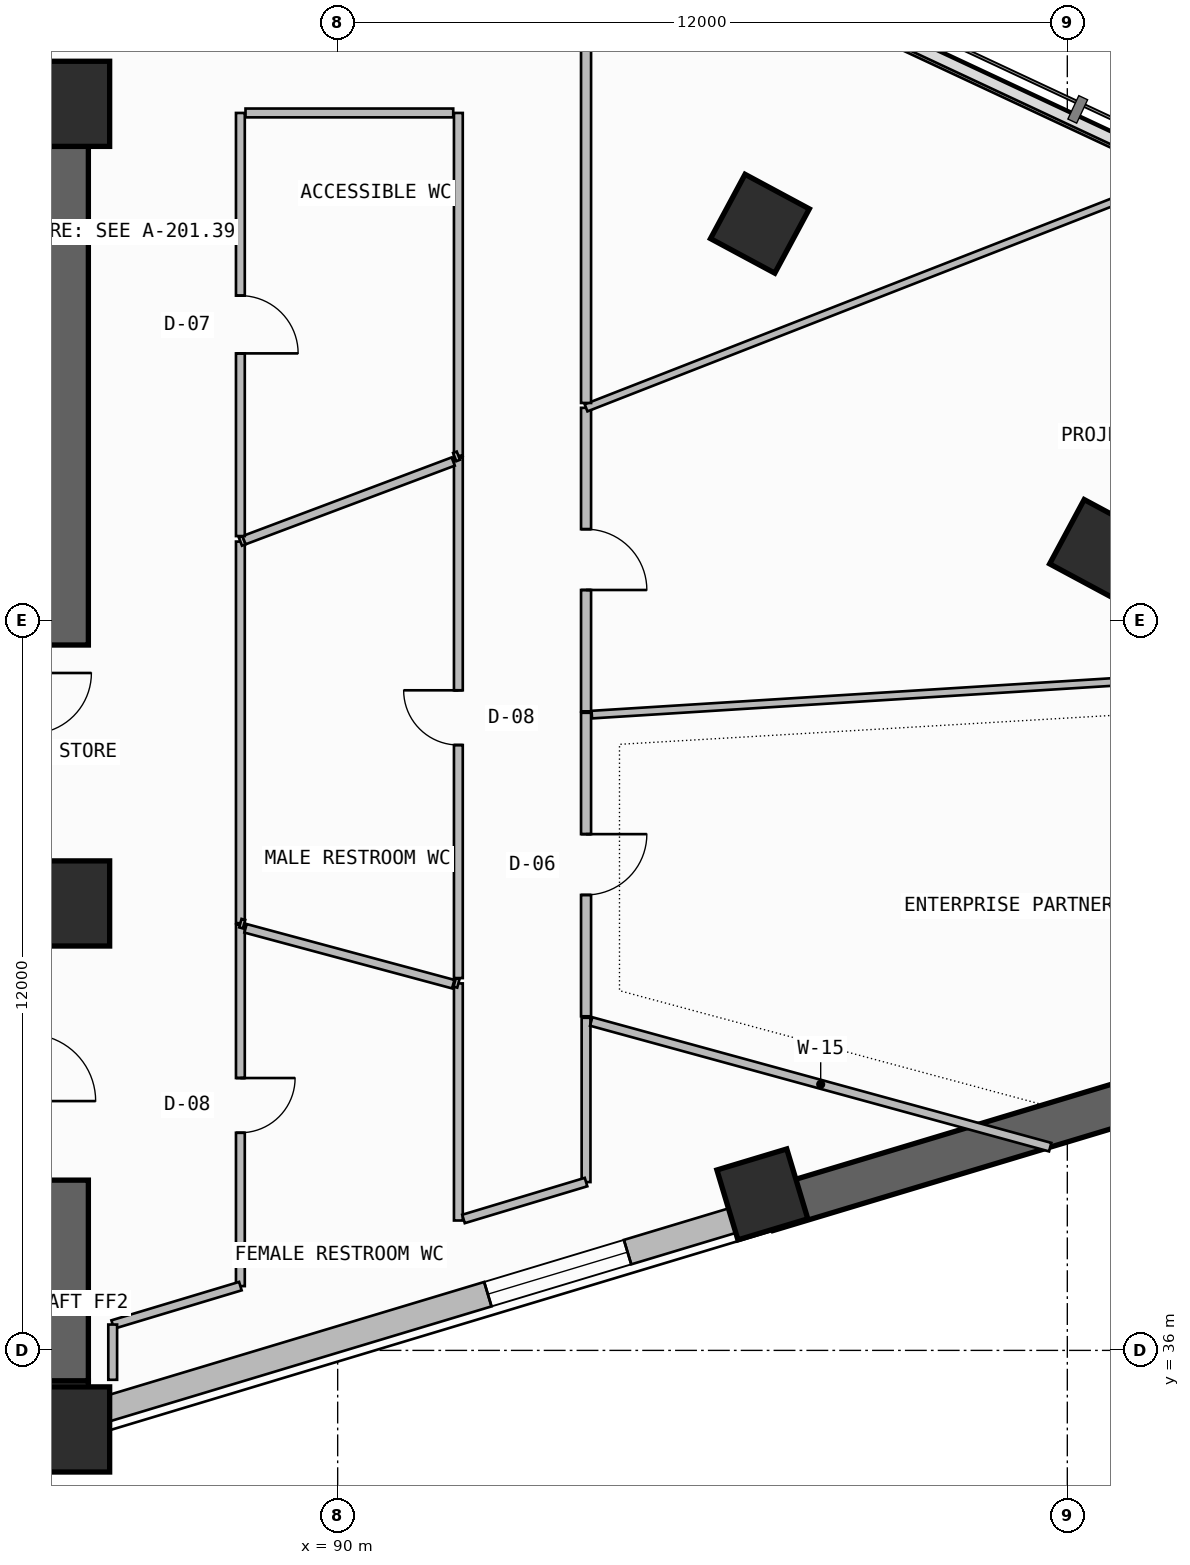
"""IFC4 building model, lengths in metres.
Left out: names, types, materials, properties, quantities, classifications, styles, units other than length and angle.
Written with IfcOpenShell. Run it as: python <this file> out.ifc"""

import sys

from ifc_helpers import new_model, si_unit, direction, frame, frame_2d, origin, origin_2d, place, context, subcontext, project, spatial, rectangle, extrude, element, fill, save


model = new_model("IFC4")
c1 = context("Model", 3, precision=1e-05, world=origin(), true_north=direction((0.0, 1.0)))
c2 = subcontext(c1, "Body", "Model", "MODEL_VIEW")
j1 = project(units=[si_unit("LENGTHUNIT", "METRE"), si_unit("PLANEANGLEUNIT", "RADIAN")], contexts=[c1])
p1 = place(None, origin())
s1 = spatial("IfcSite", under=j1, at=p1, CompositionType="ELEMENT")
p2 = place(p1, origin())
s2 = spatial("IfcBuilding", under=s1, at=p2, CompositionType="ELEMENT")
p3 = place(p2, frame((0.0, 0.0, 139.5)))
s3 = spatial("IfcBuildingStorey", under=s2, at=p3, CompositionType="ELEMENT", Elevation=139.5)
p4 = place(p3, frame((72.0, 35.05, -0.26), z_axis=(0.0, 0.0, 1.0), x_axis=(1.0, 0.0, 0.0)))
e1 = element("IfcWall", 1, at=p4, inside=s3, PredefinedType="SHEAR", context=c2, shape_type="SweptSolid", body=[
    extrude(rectangle(XDim=13.9, YDim=0.9, at=frame_2d((6.95, 0.0))), origin(), (0.0, 0.0, 1.0), 3.6),
])
p5 = place(p3, frame((85.45, 35.5, -0.26), z_axis=(0.0, 0.0, 1.0), x_axis=(0.0, 1.0, 0.0)))
e2 = element("IfcWall", 2, at=p5, inside=s3, PredefinedType="SHEAR", context=c2, shape_type="SweptSolid", body=[
    extrude(rectangle(XDim=3.3, YDim=0.9, at=frame_2d((1.65, 0.0))), origin(), (0.0, 0.0, 1.0), 3.6),
])
p6 = place(p3, frame((72.0, 56.5, -0.26), z_axis=(0.0, 0.0, 1.0), x_axis=(1.0, 0.0, 0.0)))
e3 = element("IfcWall", 3, at=p6, inside=s3, PredefinedType="SHEAR", context=c2, shape_type="SweptSolid", body=[
    extrude(rectangle(XDim=13.9, YDim=0.9, at=frame_2d((6.95, 0.0))), origin(), (0.0, 0.0, 1.0), 3.6),
])
p7 = place(p3, frame((85.45, 47.6, -0.26), z_axis=(0.0, 0.0, 1.0), x_axis=(0.0, 1.0, 0.0)))
e4 = element("IfcWall", 4, at=p7, inside=s3, PredefinedType="SHEAR", context=c2, shape_type="SweptSolid", body=[
    extrude(rectangle(XDim=8.45, YDim=0.9, at=frame_2d((4.225, 0.0))), origin(), (0.0, 0.0, 1.0), 3.6),
])
for number, where, z_axis, x_axis in (
    (5, (85.55, 34.7, 0.0), (0.0, 0.0, 1.0), (1.0, 0.0, 0.0)),
    (6, (85.55, 43.35, 0.0), (0.0, 0.0, 1.0), (1.0, 0.0, 0.0)),
    (7, (85.55, 56.5, 0.0), (0.0, 0.0, 1.0), (1.0, 0.0, 0.0)),
):
    element("IfcColumn", number, at=place(p3, frame(where, z_axis=z_axis, x_axis=x_axis)), inside=s3, PredefinedType="COLUMN", context=c2, shape_type="SweptSolid", body=[
        extrude(rectangle(XDim=1.4, YDim=1.4, at=origin_2d()), origin(), (0.0, 0.0, 1.0), 3.6),
    ])
for number, where, z_axis, x_axis in (
    (8, (96.985, 38.565, 0.0), (0.0, 0.0, 1.0), (0.958, 0.288, 0.0)),
    (9, (102.522, 49.179, 0.0), (0.0, 0.0, 1.0), (0.473, 0.881, 0.0)),
    (10, (96.944, 54.528, 0.0), (0.0, 0.0, 1.0), (0.473, 0.881, 0.0)),
):
    element("IfcColumn", number, at=place(p3, frame(where, z_axis=z_axis, x_axis=x_axis)), inside=s3, PredefinedType="COLUMN", context=c2, shape_type="SweptSolid", body=[
        extrude(rectangle(XDim=1.2, YDim=1.2, at=origin_2d()), origin(), (0.0, 0.0, 1.0), 3.6),
    ])
p8 = place(p3, frame((86.1, 35.007, 0.0), z_axis=(0.0, 0.0, 1.0), x_axis=(0.957569401796, 0.288202777129, 0.0)))
e11 = element("IfcWall", 11, at=p8, inside=s3, PredefinedType="SOLIDWALL", context=c2, shape_type="SweptSolid", body=[
    extrude(rectangle(XDim=11.448, YDim=0.42, at=frame_2d((5.724, 0.0))), origin(), (0.0, 0.0, 1.0), 2.325),
])
p9 = place(p8, frame((6.652, 0.0, 1.2)))
e12 = element("IfcOpeningElement", 12, at=p9, cuts=e11, PredefinedType="OPENING", context=c2, shape_type="SweptSolid", body=[
    extrude(rectangle(XDim=2.4, YDim=0.9, at=frame_2d((1.2, 0.45))), frame((0.0, 0.22, 0.0), z_axis=(0.0, -1.0, 0.0), x_axis=(1.0, 0.0, 0.0)), (0.0, 0.0, 1.0), 0.44),
])
p10 = place(p3, frame((97.062, 38.307, -0.26), z_axis=(0.0, 0.0, 1.0), x_axis=(0.957569832102, 0.288201347408, 0.0)))
e13 = element("IfcWall", 13, at=p10, inside=s3, PredefinedType="SHEAR", context=c2, shape_type="SweptSolid", body=[
    extrude(rectangle(XDim=13.199, YDim=0.7, at=frame_2d((6.6, 0.0))), origin(), (0.0, 0.0, 1.0), 3.6),
])
p11 = place(p3, frame((119.926, 47.843, 0.0), z_axis=(0.0, 0.0, 1.0), x_axis=(-0.905880730846, 0.423532881228, 0.0)))
e14 = element("IfcWall", 14, at=p11, inside=s3, PredefinedType="PARAPET", context=c2, shape_type="SweptSolid", body=[
    extrude(rectangle(XDim=33.748, YDim=0.2, at=frame_2d((16.874, 0.0))), origin(), (0.0, 0.0, 1.0), 1.15),
])
p12 = place(p3, frame((88.4, 37.057, 0.0), z_axis=(0.0, 0.0, 1.0), x_axis=(0.0, 1.0, 0.0)))
e15 = element("IfcWall", 15, at=p12, inside=s3, PredefinedType="PARTITIONING", context=c2, shape_type="SweptSolid", body=[
    extrude(rectangle(XDim=5.944, YDim=0.145, at=frame_2d((2.972, 0.0))), origin(), (0.0, 0.0, 1.0), 2.725),
])
p13 = place(p12, frame((2.522, 0.0, 0.0)))
e16 = element("IfcOpeningElement", 16, at=p13, cuts=e15, PredefinedType="OPENING", context=c2, shape_type="SweptSolid", body=[
    extrude(rectangle(XDim=0.9, YDim=2.1, at=frame_2d((0.45, 1.05))), frame((0.0, 0.083, 0.0), z_axis=(0.0, -1.0, 0.0), x_axis=(1.0, 0.0, 0.0)), (0.0, 0.0, 1.0), 0.165),
])
p14 = place(p3, frame((91.985, 42.035, 0.0), z_axis=(0.0, 0.0, 1.0), x_axis=(0.0, -1.0, 0.0)))
e17 = element("IfcWall", 17, at=p14, inside=s3, PredefinedType="PARTITIONING", context=c2, shape_type="SweptSolid", body=[
    extrude(rectangle(XDim=3.899, YDim=0.145, at=frame_2d((1.95, 0.0))), origin(), (0.0, 0.0, 1.0), 3.34),
])
p15 = place(p3, frame((94.085, 38.768, 0.0), z_axis=(0.0, 0.0, 1.0), x_axis=(0.0, 1.0, 0.0)))
e18 = element("IfcWall", 18, at=p15, inside=s3, PredefinedType="PARTITIONING", context=c2, shape_type="SweptSolid", body=[
    extrude(rectangle(XDim=2.701, YDim=0.145, at=frame_2d((1.351, 0.0))), origin(), (0.0, 0.0, 1.0), 3.34),
])
p16 = place(p3, frame((86.3, 36.425, 0.0), z_axis=(0.0, 0.0, 1.0), x_axis=(0.957559291079, 0.288236368399, 0.0)))
e19 = element("IfcWall", 19, at=p16, inside=s3, PredefinedType="PARTITIONING", context=c2, shape_type="SweptSolid", body=[
    extrude(rectangle(XDim=2.193, YDim=0.145, at=frame_2d((1.096, 0.0))), origin(), (0.0, 0.0, 1.0), 3.34),
])
p17 = place(p3, frame((92.07, 38.162, 0.0), z_axis=(0.0, 0.0, 1.0), x_axis=(0.957586501491, 0.288145956354, 0.0)))
e20 = element("IfcWall", 20, at=p17, inside=s3, PredefinedType="PARTITIONING", context=c2, shape_type="SweptSolid", body=[
    extrude(rectangle(XDim=2.105, YDim=0.145, at=frame_2d((1.052, 0.0))), origin(), (0.0, 0.0, 1.0), 3.34),
])
p18 = place(p3, frame((91.925, 42.052, 0.0), z_axis=(0.0, 0.0, 1.0), x_axis=(0.965842837235, -0.259128566087, 0.0)))
e21 = element("IfcWall", 21, at=p18, inside=s3, PredefinedType="PARTITIONING", context=c2, shape_type="SweptSolid", body=[
    extrude(rectangle(XDim=0.062, YDim=0.145, at=frame_2d((0.031, 0.0))), origin(), (0.0, 0.0, 1.0), 3.34),
])
p19 = place(p3, frame((94.169, 41.409, 0.0), z_axis=(0.0, 0.0, 1.0), x_axis=(0.964509993059, -0.264046346859, 0.0)))
e22 = element("IfcWall", 22, at=p19, inside=s3, PredefinedType="PARTITIONING", context=c2, shape_type="SweptSolid", body=[
    extrude(rectangle(XDim=7.827, YDim=0.145, at=frame_2d((3.914, 0.0))), origin(), (0.0, 0.0, 1.0), 2.325),
])
p20 = place(p3, frame((88.485, 42.941, 0.0), z_axis=(0.0, 0.0, 1.0), x_axis=(0.96571631857, -0.259599676516, 0.0)))
e23 = element("IfcWall", 23, at=p20, inside=s3, PredefinedType="PARTITIONING", context=c2, shape_type="SweptSolid", body=[
    extrude(rectangle(XDim=3.537, YDim=0.145, at=frame_2d((1.769, 0.0))), origin(), (0.0, 0.0, 1.0), 2.725),
])
p21 = place(p3, frame((94.085, 41.494, 0.0), z_axis=(0.0, 0.0, 1.0), x_axis=(0.0, 1.0, 0.0)))
e24 = element("IfcWall", 24, at=p21, inside=s3, PredefinedType="PARTITIONING", context=c2, shape_type="SweptSolid", body=[
    extrude(rectangle(XDim=4.991, YDim=0.165, at=frame_2d((2.496, 0.0))), origin(), (0.0, 0.0, 1.0), 2.725),
])
p22 = place(p21, frame((1.996, 0.0, 0.0)))
e25 = element("IfcOpeningElement", 25, at=p22, cuts=e24, PredefinedType="OPENING", context=c2, shape_type="SweptSolid", body=[
    extrude(rectangle(XDim=1.0, YDim=2.2, at=frame_2d((0.5, 1.1))), frame((0.0, 0.093, 0.0), z_axis=(0.0, -1.0, 0.0), x_axis=(1.0, 0.0, 0.0)), (0.0, 0.0, 1.0), 0.185),
])
p23 = place(p3, frame((94.179, 46.455, 0.0), z_axis=(0.0, 0.0, 1.0), x_axis=(0.998042031033, 0.062546816791, 0.0)))
e26 = element("IfcWall", 26, at=p23, inside=s3, PredefinedType="PARTITIONING", context=c2, shape_type="SweptSolid", body=[
    extrude(rectangle(XDim=25.703, YDim=0.125, at=frame_2d((12.852, 0.0))), origin(), (0.0, 0.0, 1.0), 2.725),
])
p24 = place(p3, frame((94.085, 46.51, 0.0), z_axis=(0.0, 0.0, 1.0), x_axis=(0.0, 1.0, 0.0)))
e27 = element("IfcWall", 27, at=p24, inside=s3, PredefinedType="PARTITIONING", context=c2, shape_type="SweptSolid", body=[
    extrude(rectangle(XDim=4.991, YDim=0.165, at=frame_2d((2.496, 0.0))), origin(), (0.0, 0.0, 1.0), 2.725),
])
p25 = place(p24, frame((1.996, 0.0, 0.0)))
e28 = element("IfcOpeningElement", 28, at=p25, cuts=e27, PredefinedType="OPENING", context=c2, shape_type="SweptSolid", body=[
    extrude(rectangle(XDim=1.0, YDim=2.2, at=frame_2d((0.5, 1.1))), frame((0.0, 0.093, 0.0), z_axis=(0.0, -1.0, 0.0), x_axis=(1.0, 0.0, 0.0)), (0.0, 0.0, 1.0), 0.185),
])
p26 = place(p3, frame((94.085, 51.5, 0.0), z_axis=(0.0, 0.0, 1.0), x_axis=(0.931423458571, 0.363937275948, 0.0)))
e29 = element("IfcWall", 29, at=p26, inside=s3, PredefinedType="PARTITIONING", context=c2, shape_type="SweptSolid", body=[
    extrude(rectangle(XDim=10.759, YDim=0.125, at=frame_2d((5.379, 0.0))), origin(), (0.0, 0.0, 1.0), 2.725),
])
p27 = place(p3, frame((91.985, 50.688, 0.0), z_axis=(0.0, 0.0, 1.0), x_axis=(0.0, -1.0, 0.0)))
e30 = element("IfcWall", 30, at=p27, inside=s3, PredefinedType="PARTITIONING", context=c2, shape_type="SweptSolid", body=[
    extrude(rectangle(XDim=8.565, YDim=0.145, at=frame_2d((4.283, 0.0))), origin(), (0.0, 0.0, 1.0), 2.725),
])
p28 = place(p27, frame((3.833, 0.0, 0.0)))
e31 = element("IfcOpeningElement", 31, at=p28, cuts=e30, PredefinedType="OPENING", context=c2, shape_type="SweptSolid", body=[
    extrude(rectangle(XDim=0.9, YDim=2.1, at=frame_2d((0.45, 1.05))), frame((0.0, 0.083, 0.0), z_axis=(0.0, -1.0, 0.0), x_axis=(1.0, 0.0, 0.0)), (0.0, 0.0, 1.0), 0.165),
])
p29 = place(p3, frame((88.4, 43.026, 0.0), z_axis=(0.0, 0.0, 1.0), x_axis=(0.0, 1.0, 0.0)))
e32 = element("IfcWall", 32, at=p29, inside=s3, PredefinedType="PARTITIONING", context=c2, shape_type="SweptSolid", body=[
    extrude(rectangle(XDim=6.275, YDim=0.145, at=frame_2d((3.138, 0.0))), origin(), (0.0, 0.0, 1.0), 2.725),
])
p30 = place(p3, frame((88.4, 49.301, 0.0), z_axis=(0.0, 0.0, 1.0), x_axis=(0.932856069012, 0.360249294944, 0.0)))
e33 = element("IfcWall", 33, at=p30, inside=s3, PredefinedType="PARTITIONING", context=c2, shape_type="SweptSolid", body=[
    extrude(rectangle(XDim=0.064, YDim=0.145, at=frame_2d((0.032, 0.0))), origin(), (0.0, 0.0, 1.0), 3.34),
])
p31 = place(p3, frame((88.46, 43.01, 0.0), z_axis=(0.0, 0.0, 1.0), x_axis=(-0.965842837235, 0.259128566087, 0.0)))
e34 = element("IfcWall", 34, at=p31, inside=s3, PredefinedType="PARTITIONING", context=c2, shape_type="SweptSolid", body=[
    extrude(rectangle(XDim=0.062, YDim=0.145, at=frame_2d((0.031, 0.0))), origin(), (0.0, 0.0, 1.0), 2.725),
])
p32 = place(p3, frame((88.46, 49.324, 0.0), z_axis=(0.0, 0.0, 1.0), x_axis=(0.935982041956, 0.352047748376, 0.0)))
e35 = element("IfcWall", 35, at=p32, inside=s3, PredefinedType="PARTITIONING", context=c2, shape_type="SweptSolid", body=[
    extrude(rectangle(XDim=3.676, YDim=0.145, at=frame_2d((1.838, 0.0))), origin(), (0.0, 0.0, 1.0), 2.925),
])
p33 = place(p3, frame((88.4, 49.392, 0.0), z_axis=(0.0, 0.0, 1.0), x_axis=(0.0, 1.0, 0.0)))
e36 = element("IfcWall", 36, at=p33, inside=s3, PredefinedType="PARTITIONING", context=c2, shape_type="SweptSolid", body=[
    extrude(rectangle(XDim=6.958, YDim=0.145, at=frame_2d((3.479, 0.0))), origin(), (0.0, 0.0, 1.0), 2.725),
])
p34 = place(p33, frame((3.004, 0.0, 0.0)))
e37 = element("IfcOpeningElement", 37, at=p34, cuts=e36, PredefinedType="OPENING", context=c2, shape_type="SweptSolid", body=[
    extrude(rectangle(XDim=0.95, YDim=2.15, at=frame_2d((0.475, 1.075))), frame((0.0, 0.083, 0.0), z_axis=(0.0, -1.0, 0.0), x_axis=(1.0, 0.0, 0.0)), (0.0, 0.0, 1.0), 0.165),
])
p35 = place(p3, frame((91.985, 56.35, 0.0), z_axis=(0.0, 0.0, 1.0), x_axis=(0.0, -1.0, 0.0)))
e38 = element("IfcWall", 38, at=p35, inside=s3, PredefinedType="PARTITIONING", context=c2, shape_type="SweptSolid", body=[
    extrude(rectangle(XDim=5.636, YDim=0.145, at=frame_2d((2.818, 0.0))), origin(), (0.0, 0.0, 1.0), 2.725),
])
p36 = place(p3, frame((88.485, 56.35, 0.0), z_axis=(0.0, 0.0, 1.0), x_axis=(1.0, 0.0, 0.0)))
e39 = element("IfcWall", 39, at=p36, inside=s3, PredefinedType="PARTITIONING", context=c2, shape_type="SweptSolid", body=[
    extrude(rectangle(XDim=3.416, YDim=0.145, at=frame_2d((1.708, 0.0))), origin(), (0.0, 0.0, 1.0), 2.925),
])
p37 = place(p3, frame((91.985, 50.714, 0.0), z_axis=(0.0, 0.0, 1.0), x_axis=(-0.931577619485, -0.363542485653, 0.0)))
e40 = element("IfcWall", 40, at=p37, inside=s3, PredefinedType="PARTITIONING", context=c2, shape_type="SweptSolid", body=[
    extrude(rectangle(XDim=0.064, YDim=0.145, at=frame_2d((0.032, 0.0))), origin(), (0.0, 0.0, 1.0), 2.925),
])
p38 = place(p3, frame((94.085, 51.581, 0.0), z_axis=(0.0, 0.0, 1.0), x_axis=(0.0, 1.0, 0.0)))
e41 = element("IfcWall", 41, at=p38, inside=s3, PredefinedType="PARTITIONING", context=c2, shape_type="SweptSolid", body=[
    extrude(rectangle(XDim=7.253, YDim=0.165, at=frame_2d((3.626, 0.0))), origin(), (0.0, 0.0, 1.0), 2.725),
])
p39 = place(p3, frame((86.3, 35.517, 0.0), z_axis=(0.0, 0.0, 1.0), x_axis=(0.0, 1.0, 0.0)))
e42 = element("IfcWall", 42, at=p39, inside=s3, PredefinedType="PARTITIONING", context=c2, shape_type="SweptSolid", body=[
    extrude(rectangle(XDim=0.908, YDim=0.145, at=frame_2d((0.454, 0.0))), origin(), (0.0, 0.0, 1.0), 3.34),
])
p40 = place(p9, origin())
e43 = element("IfcWindow", 43, at=p40, inside=s3, PartitioningType="SINGLE_PANEL", PredefinedType="WINDOW", context=c2, shape_type="SweptSolid", body=[
    extrude(rectangle(XDim=2.4, YDim=0.9, at=frame_2d((1.2, 0.45))), frame((0.0, 0.03, 0.0), z_axis=(0.0, -1.0, 0.0), x_axis=(1.0, 0.0, 0.0)), (0.0, 0.0, 1.0), 0.06),
])
fill(e12, e43)
p41 = place(p13, frame((0.9, 0.0, 0.0), z_axis=(0.0, 0.0, 1.0), x_axis=(-1.0, 0.0, 0.0)))
e44 = element("IfcDoor", 44, at=p41, inside=s3, OperationType="SINGLE_SWING_LEFT", PredefinedType="DOOR", context=c2, shape_type="SweptSolid", body=[
    extrude(rectangle(XDim=0.9, YDim=2.1, at=frame_2d((0.45, 1.05))), frame((0.0, 0.025, 0.0), z_axis=(0.0, -1.0, 0.0), x_axis=(1.0, 0.0, 0.0)), (0.0, 0.0, 1.0), 0.05),
])
fill(e16, e44)
p42 = place(p22, frame((1.0, 0.0, 0.0), z_axis=(0.0, 0.0, 1.0), x_axis=(-1.0, 0.0, 0.0)))
e45 = element("IfcDoor", 45, at=p42, inside=s3, OperationType="SINGLE_SWING_LEFT", PredefinedType="DOOR", context=c2, shape_type="SweptSolid", body=[
    extrude(rectangle(XDim=1.0, YDim=2.2, at=frame_2d((0.5, 1.1))), frame((0.0, 0.025, 0.0), z_axis=(0.0, -1.0, 0.0), x_axis=(1.0, 0.0, 0.0)), (0.0, 0.0, 1.0), 0.05),
])
fill(e25, e45)
p43 = place(p25, frame((1.0, 0.0, 0.0), z_axis=(0.0, 0.0, 1.0), x_axis=(-1.0, 0.0, 0.0)))
e46 = element("IfcDoor", 46, at=p43, inside=s3, OperationType="SINGLE_SWING_RIGHT", PredefinedType="DOOR", context=c2, shape_type="SweptSolid", body=[
    extrude(rectangle(XDim=1.0, YDim=2.2, at=frame_2d((0.5, 1.1))), frame((0.0, 0.025, 0.0), z_axis=(0.0, -1.0, 0.0), x_axis=(1.0, 0.0, 0.0)), (0.0, 0.0, 1.0), 0.05),
])
fill(e28, e46)
p44 = place(p28, frame((0.9, 0.0, 0.0), z_axis=(0.0, 0.0, 1.0), x_axis=(-1.0, 0.0, 0.0)))
e47 = element("IfcDoor", 47, at=p44, inside=s3, OperationType="SINGLE_SWING_RIGHT", PredefinedType="DOOR", context=c2, shape_type="SweptSolid", body=[
    extrude(rectangle(XDim=0.9, YDim=2.1, at=frame_2d((0.45, 1.05))), frame((0.0, 0.025, 0.0), z_axis=(0.0, -1.0, 0.0), x_axis=(1.0, 0.0, 0.0)), (0.0, 0.0, 1.0), 0.05),
])
fill(e31, e47)
p45 = place(p34, frame((0.95, 0.0, 0.0), z_axis=(0.0, 0.0, 1.0), x_axis=(-1.0, 0.0, 0.0)))
e48 = element("IfcDoor", 48, at=p45, inside=s3, OperationType="SINGLE_SWING_RIGHT", PredefinedType="DOOR", context=c2, shape_type="SweptSolid", body=[
    extrude(rectangle(XDim=0.95, YDim=2.15, at=frame_2d((0.475, 1.075))), frame((0.0, 0.025, 0.0), z_axis=(0.0, -1.0, 0.0), x_axis=(1.0, 0.0, 0.0)), (0.0, 0.0, 1.0), 0.05),
])
fill(e37, e48)
save(model, sys.argv[1])
